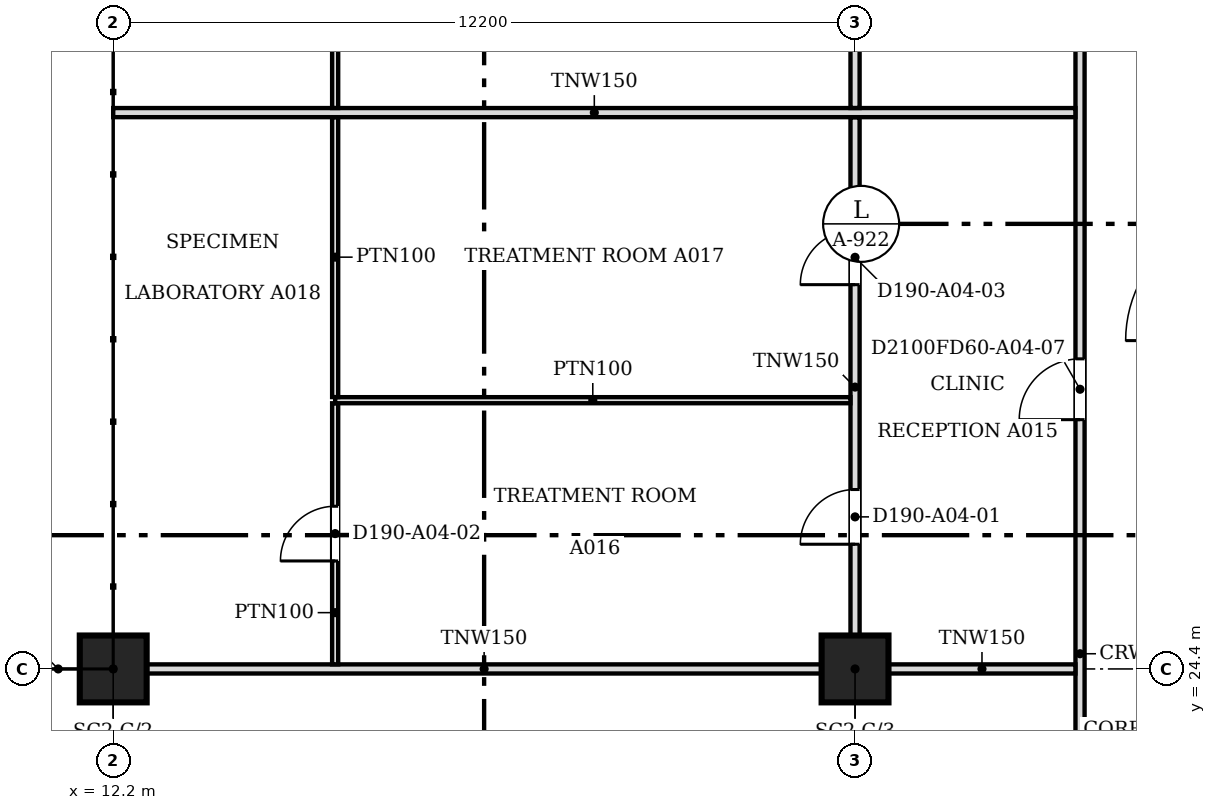
"""IFC4 building model, lengths in metres.
Left out: names, types, materials, properties, quantities, classifications, styles, units other than length and angle.
Written with IfcOpenShell. Run it as: python <this file> out.ifc"""

import sys

from ifc_helpers import new_model, si_unit, direction, frame, frame_2d, origin, origin_2d, place, context, subcontext, project, spatial, rectangle, extrude, source, transform, mapped, element, fill, save


model = new_model("IFC4")
c1 = context("Model", 3, precision=1e-05, world=origin(), true_north=direction((0.0, 1.0)))
c2 = subcontext(c1, "Body", "Model", "MODEL_VIEW")
j1 = project(units=[si_unit("LENGTHUNIT", "METRE"), si_unit("PLANEANGLEUNIT", "RADIAN")], contexts=[c1])
p1 = place(None, origin())
s1 = spatial("IfcSite", under=j1, at=p1, CompositionType="ELEMENT")
p2 = place(p1, origin())
s2 = spatial("IfcBuilding", under=s1, at=p2, CompositionType="ELEMENT")
p3 = place(p2, frame((0.0, 0.0, 48.6)))
s3 = spatial("IfcBuildingStorey", under=s2, at=p3, CompositionType="ELEMENT", Elevation=48.6)
for number, where, z_axis, x_axis in (
    (1, (12.2, 24.4, 0.0), (0.0, 0.0, 1.0), (1.0, 0.0, 0.0)),
    (2, (24.4, 24.4, 0.0), (0.0, 0.0, 1.0), (1.0, 0.0, 0.0)),
):
    element("IfcColumn", number, at=place(p3, frame(where, z_axis=z_axis, x_axis=x_axis)), inside=s3, PredefinedType="COLUMN", context=c2, shape_type="SweptSolid", body=[
        extrude(rectangle(XDim=1.1, YDim=1.1, at=origin_2d()), origin(), (0.0, 0.0, 1.0), 3.6),
    ])
p4 = place(p3, frame((28.1, 18.8, 0.0), z_axis=(0.0, 0.0, 1.0), x_axis=(0.0, 1.0, 0.0)))
e3 = element("IfcWall", 3, at=p4, inside=s3, PredefinedType="PARTITIONING", context=c2, shape_type="SweptSolid", body=[
    extrude(rectangle(XDim=26.1, YDim=0.15, at=frame_2d((13.05, 0.0))), origin(), (0.0, 0.0, 1.0), 3.067),
])
m1 = source(origin(), c2, "Body", "SweptSolid", [
    extrude(rectangle(XDim=0.9, YDim=2.1, at=frame_2d((0.45, 1.05))), frame((0.0, 0.085, 0.0), z_axis=(0.0, -1.0, 0.0), x_axis=(1.0, 0.0, 0.0)), (0.0, 0.0, 1.0), 0.17),
])
p5 = place(p4, frame((1.1, 0.0, 0.0)))
e4 = element("IfcOpeningElement", 4, at=p5, cuts=e3, PredefinedType="OPENING", context=c2, shape_type="MappedRepresentation", body=[
    mapped(m1, transform((0.0, 0.0, 0.0), scale=1.0)),
])
m2 = source(origin(), c2, "Body", "SweptSolid", [
    extrude(rectangle(XDim=1.0, YDim=2.1, at=frame_2d((0.5, 1.05))), frame((0.0, 0.085, 0.0), z_axis=(0.0, -1.0, 0.0), x_axis=(1.0, 0.0, 0.0)), (0.0, 0.0, 1.0), 0.17),
])
p6 = place(p4, frame((22.951, 0.0, 0.0)))
e5 = element("IfcOpeningElement", 5, at=p6, cuts=e3, PredefinedType="OPENING", context=c2, shape_type="MappedRepresentation", body=[
    mapped(m2, transform((0.0, 0.0, 0.0), scale=1.0)),
])
p7 = place(p4, frame((17.251, 0.0, 0.0)))
e6 = element("IfcOpeningElement", 6, at=p7, cuts=e3, PredefinedType="OPENING", context=c2, shape_type="MappedRepresentation", body=[
    mapped(m2, transform((0.0, 0.0, 0.0), scale=1.0)),
])
p8 = place(p4, frame((9.7, 0.0, 0.0)))
e7 = element("IfcOpeningElement", 7, at=p8, cuts=e3, PredefinedType="OPENING", context=c2, shape_type="MappedRepresentation", body=[
    mapped(m2, transform((0.0, 0.0, 0.0), scale=1.0)),
])
p9 = place(p3, frame((12.751, 24.4, 0.0), z_axis=(0.0, 0.0, 1.0), x_axis=(1.0, 0.0, 0.0)))
e8 = element("IfcWall", 8, at=p9, inside=s3, PredefinedType="PARTITIONING", context=c2, shape_type="SweptSolid", body=[
    extrude(rectangle(XDim=11.098, YDim=0.15, at=frame_2d((5.549, 0.0))), origin(), (0.0, 0.0, 1.0), 3.067),
])
p10 = place(p3, frame((24.951, 24.4, 0.0), z_axis=(0.0, 0.0, 1.0), x_axis=(1.0, 0.0, 0.0)))
e9 = element("IfcWall", 9, at=p10, inside=s3, PredefinedType="PARTITIONING", context=c2, shape_type="SweptSolid", body=[
    extrude(rectangle(XDim=3.073, YDim=0.15, at=frame_2d((1.537, 0.0))), origin(), (0.0, 0.0, 1.0), 3.067),
])
p11 = place(p3, frame((15.85, 24.476, 0.0), z_axis=(0.0, 0.0, 1.0), x_axis=(0.0, 1.0, 0.0)))
e10 = element("IfcWall", 10, at=p11, inside=s3, PredefinedType="PARTITIONING", context=c2, shape_type="SweptSolid", body=[
    extrude(rectangle(XDim=4.293, YDim=0.1, at=frame_2d((2.146, 0.0))), origin(), (0.0, 0.0, 1.0), 3.067),
])
m3 = source(origin(), c2, "Body", "SweptSolid", [
    extrude(rectangle(XDim=0.9, YDim=2.1, at=frame_2d((0.45, 1.05))), frame((0.0, 0.06, 0.0), z_axis=(0.0, -1.0, 0.0), x_axis=(1.0, 0.0, 0.0)), (0.0, 0.0, 1.0), 0.12),
])
p12 = place(p11, frame((1.7, 0.0, 0.0)))
e11 = element("IfcOpeningElement", 11, at=p12, cuts=e10, PredefinedType="OPENING", context=c2, shape_type="MappedRepresentation", body=[
    mapped(m3, transform((0.0, 0.0, 0.0), scale=1.0)),
])
p13 = place(p3, frame((24.4, 24.951, 0.0), z_axis=(0.0, 0.0, 1.0), x_axis=(0.0, 1.0, 0.0)))
e12 = element("IfcWall", 12, at=p13, inside=s3, PredefinedType="PARTITIONING", context=c2, shape_type="SweptSolid", body=[
    extrude(rectangle(XDim=8.523, YDim=0.15, at=frame_2d((4.262, 0.0))), origin(), (0.0, 0.0, 1.0), 3.067),
])
p14 = place(p13, frame((1.5, 0.0, 0.0)))
e13 = element("IfcOpeningElement", 13, at=p14, cuts=e12, PredefinedType="OPENING", context=c2, shape_type="MappedRepresentation", body=[
    mapped(m1, transform((0.0, 0.0, 0.0), scale=1.0)),
])
p15 = place(p13, frame((5.769, 0.0, 0.0)))
e14 = element("IfcOpeningElement", 14, at=p15, cuts=e12, PredefinedType="OPENING", context=c2, shape_type="MappedRepresentation", body=[
    mapped(m1, transform((0.0, 0.0, 0.0), scale=1.0)),
])
p16 = place(p3, frame((15.85, 28.82, 0.0), z_axis=(0.0, 0.0, 1.0), x_axis=(1.0, 0.0, 0.0)))
e15 = element("IfcWall", 15, at=p16, inside=s3, PredefinedType="PARTITIONING", context=c2, shape_type="SweptSolid", body=[
    extrude(rectangle(XDim=8.474, YDim=0.1, at=frame_2d((4.237, 0.0))), origin(), (0.0, 0.0, 1.0), 3.067),
])
p17 = place(p3, frame((15.85, 28.871, 0.0), z_axis=(0.0, 0.0, 1.0), x_axis=(0.0, 1.0, 0.0)))
e16 = element("IfcWall", 16, at=p17, inside=s3, PredefinedType="PARTITIONING", context=c2, shape_type="SweptSolid", body=[
    extrude(rectangle(XDim=4.603, YDim=0.1, at=frame_2d((2.301, 0.0))), origin(), (0.0, 0.0, 1.0), 3.067),
])
p18 = place(p3, frame((12.2, 33.55, 0.0), z_axis=(0.0, 0.0, 1.0), x_axis=(1.0, 0.0, 0.0)))
e17 = element("IfcWall", 17, at=p18, inside=s3, PredefinedType="PARTITIONING", context=c2, shape_type="SweptSolid", body=[
    extrude(rectangle(XDim=15.824, YDim=0.15, at=frame_2d((7.912, 0.0))), origin(), (0.0, 0.0, 1.0), 3.067),
])
p19 = place(p3, frame((15.85, 33.626, 0.0), z_axis=(0.0, 0.0, 1.0), x_axis=(0.0, 1.0, 0.0)))
e18 = element("IfcWall", 18, at=p19, inside=s3, PredefinedType="PARTITIONING", context=c2, shape_type="SweptSolid", body=[
    extrude(rectangle(XDim=5.948, YDim=0.1, at=frame_2d((2.974, 0.0))), origin(), (0.0, 0.0, 1.0), 3.067),
])
p20 = place(p19, frame((2.5, 0.0, 0.0)))
e19 = element("IfcOpeningElement", 19, at=p20, cuts=e18, PredefinedType="OPENING", context=c2, shape_type="MappedRepresentation", body=[
    mapped(m3, transform((0.0, 0.0, 0.0), scale=1.0)),
])
p21 = place(p3, frame((24.4, 33.626, 0.0), z_axis=(0.0, 0.0, 1.0), x_axis=(0.0, 1.0, 0.0)))
e20 = element("IfcWall", 20, at=p21, inside=s3, PredefinedType="PARTITIONING", context=c2, shape_type="SweptSolid", body=[
    extrude(rectangle(XDim=2.423, YDim=0.15, at=frame_2d((1.211, 0.0))), origin(), (0.0, 0.0, 1.0), 3.067),
])
m4 = source(origin(), c2, "Body", "SweptSolid", [
    extrude(rectangle(XDim=0.9, YDim=2.1, at=frame_2d((0.45, 1.05))), frame((0.0, 0.025, 0.0), z_axis=(0.0, -1.0, 0.0), x_axis=(1.0, 0.0, 0.0)), (0.0, 0.0, 1.0), 0.05),
])
p22 = place(p14, origin())
e21 = element("IfcDoor", 21, at=p22, inside=s3, OperationType="SINGLE_SWING_LEFT", PredefinedType="DOOR", context=c2, shape_type="MappedRepresentation", body=[
    mapped(m4, transform((0.0, 0.0, 0.0), scale=1.0)),
])
fill(e13, e21)
p23 = place(p12, origin())
e22 = element("IfcDoor", 22, at=p23, inside=s3, OperationType="SINGLE_SWING_LEFT", PredefinedType="DOOR", context=c2, shape_type="MappedRepresentation", body=[
    mapped(m4, transform((0.0, 0.0, 0.0), scale=1.0)),
])
fill(e11, e22)
p24 = place(p15, origin())
e23 = element("IfcDoor", 23, at=p24, inside=s3, OperationType="SINGLE_SWING_LEFT", PredefinedType="DOOR", context=c2, shape_type="MappedRepresentation", body=[
    mapped(m4, transform((0.0, 0.0, 0.0), scale=1.0)),
])
fill(e14, e23)
m5 = source(origin(), c2, "Body", "SweptSolid", [
    extrude(rectangle(XDim=1.0, YDim=2.1, at=frame_2d((0.5, 1.05))), frame((0.0, 0.025, 0.0), z_axis=(0.0, -1.0, 0.0), x_axis=(1.0, 0.0, 0.0)), (0.0, 0.0, 1.0), 0.05),
])
p25 = place(p8, origin())
e24 = element("IfcDoor", 24, at=p25, inside=s3, OperationType="SINGLE_SWING_LEFT", PredefinedType="DOOR", context=c2, shape_type="MappedRepresentation", body=[
    mapped(m5, transform((0.0, 0.0, 0.0), scale=1.0)),
])
fill(e7, e24)
save(model, sys.argv[1])
